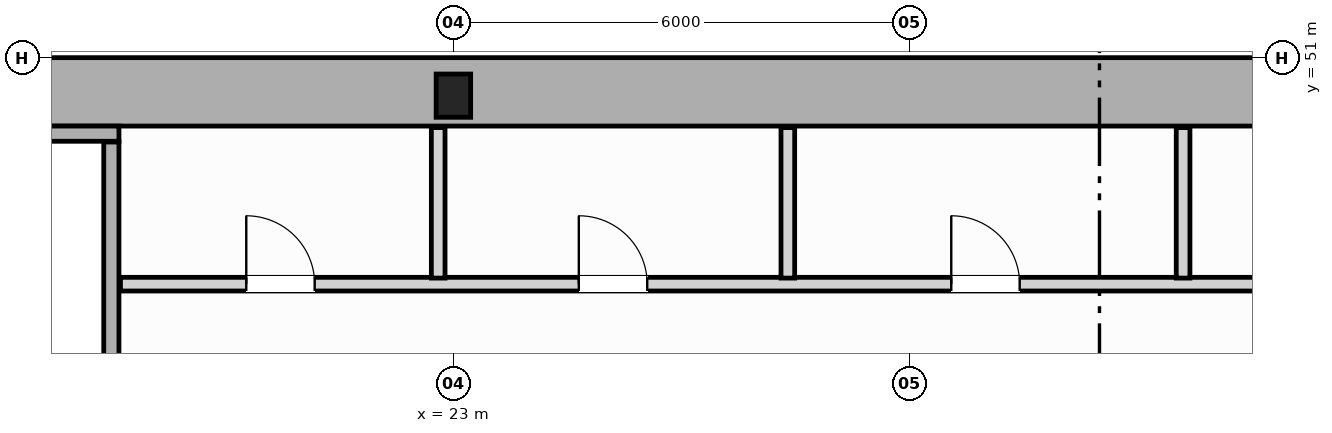
"""IFC4 building model, lengths in metres.
Left out: names, types, materials, properties, quantities, classifications, styles, units other than length and angle.
Written with IfcOpenShell. Run it as: python <this file> out.ifc"""

import sys

from ifc_helpers import new_model, si_unit, direction, frame, frame_2d, origin, origin_2d, place, context, subcontext, project, spatial, rectangle, i_section, extrude, source, transform, mapped, element, fill, save


model = new_model("IFC4")
c1 = context("Model", 3, precision=1e-05, world=origin(), true_north=direction((0.0, 1.0)))
c2 = subcontext(c1, "Body", "Model", "MODEL_VIEW")
j1 = project(units=[si_unit("LENGTHUNIT", "METRE"), si_unit("PLANEANGLEUNIT", "RADIAN")], contexts=[c1])
p1 = place(None, origin())
s1 = spatial("IfcSite", under=j1, at=p1, CompositionType="ELEMENT")
p2 = place(p1, origin())
s2 = spatial("IfcBuilding", under=s1, at=p2, CompositionType="ELEMENT")
p3 = place(p2, origin())
s3 = spatial("IfcBuildingStorey", under=s2, at=p3, CompositionType="ELEMENT", Elevation=0.0)
m1 = source(origin(), c2, "Body", "SweptSolid", [
    extrude(i_section(OverallWidth=0.454, OverallDepth=0.569, WebThickness=0.078, FlangeThickness=0.08, FilletRadius=0.015, at=origin_2d()), origin(), (0.0, 0.0, 1.0), 5.6),
])
p4 = place(p3, frame((23.0, 50.5, 0.0), z_axis=(0.0, 0.0, 1.0), x_axis=(1.0, 0.0, 0.0)))
e1 = element("IfcColumn", 1, at=p4, inside=s3, PredefinedType="COLUMN", context=c2, shape_type="MappedRepresentation", body=[
    mapped(m1, transform((0.0, 0.0, 0.0), scale=1.0)),
])
p5 = place(p3, frame((14.454, 50.55, 0.0), z_axis=(0.0, 0.0, 1.0), x_axis=(1.0, 0.0, 0.0)))
e2 = element("IfcWall", 2, at=p5, inside=s3, PredefinedType="SHEAR", context=c2, shape_type="SweptSolid", body=[
    extrude(rectangle(XDim=19.544, YDim=0.9, at=frame_2d((9.772, 0.0))), origin(), (0.0, 0.0, 1.0), 5.6),
])
p6 = place(p3, frame((14.45, 50.0, 0.0), z_axis=(0.0, 0.0, 1.0), x_axis=(1.0, 0.0, 0.0)))
e3 = element("IfcWall", 3, at=p6, inside=s3, PredefinedType="SOLIDWALL", context=c2, shape_type="SweptSolid", body=[
    extrude(rectangle(XDim=4.15, YDim=0.2, at=frame_2d((2.075, 0.0))), origin(), (0.0, 0.0, 1.0), 5.6),
])
p7 = place(p3, frame((18.5, 39.96, 0.0), z_axis=(0.0, 0.0, 1.0), x_axis=(0.0, 1.0, 0.0)))
e4 = element("IfcWall", 4, at=p7, inside=s3, PredefinedType="SOLIDWALL", context=c2, shape_type="SweptSolid", body=[
    extrude(rectangle(XDim=9.93, YDim=0.2, at=frame_2d((4.965, 0.0))), origin(), (0.0, 0.0, 1.0), 5.6),
])
p8 = place(p3, frame((18.62, 48.02, 0.0), z_axis=(0.0, 0.0, 1.0), x_axis=(1.0, 0.0, 0.0)))
e5 = element("IfcWall", 5, at=p8, inside=s3, PredefinedType="PLUMBINGWALL", context=c2, shape_type="SweptSolid", body=[
    extrude(rectangle(XDim=30.76, YDim=0.18, at=frame_2d((15.38, 0.0))), origin(), (0.0, 0.0, 1.0), 5.32),
])
p9 = place(p8, frame((1.655, 0.0, 0.0)))
e6 = element("IfcOpeningElement", 6, at=p9, cuts=e5, PredefinedType="OPENING", context=c2, shape_type="SweptSolid", body=[
    extrude(rectangle(XDim=0.9, YDim=2.15, at=frame_2d((0.45, 1.075))), frame((0.0, 0.1, 0.0), z_axis=(0.0, -1.0, 0.0), x_axis=(1.0, 0.0, 0.0)), (0.0, 0.0, 1.0), 0.2),
])
p10 = place(p8, frame((6.03, 0.0, 0.0)))
e7 = element("IfcOpeningElement", 7, at=p10, cuts=e5, PredefinedType="OPENING", context=c2, shape_type="SweptSolid", body=[
    extrude(rectangle(XDim=0.9, YDim=2.15, at=frame_2d((0.45, 1.075))), frame((0.0, 0.1, 0.0), z_axis=(0.0, -1.0, 0.0), x_axis=(1.0, 0.0, 0.0)), (0.0, 0.0, 1.0), 0.2),
])
p11 = place(p8, frame((10.93, 0.0, 0.0)))
e8 = element("IfcOpeningElement", 8, at=p11, cuts=e5, PredefinedType="OPENING", context=c2, shape_type="SweptSolid", body=[
    extrude(rectangle(XDim=0.9, YDim=2.15, at=frame_2d((0.45, 1.075))), frame((0.0, 0.1, 0.0), z_axis=(0.0, -1.0, 0.0), x_axis=(1.0, 0.0, 0.0)), (0.0, 0.0, 1.0), 0.2),
])
p12 = place(p8, frame((16.13, 0.0, 0.0)))
e9 = element("IfcOpeningElement", 9, at=p12, cuts=e5, PredefinedType="OPENING", context=c2, shape_type="SweptSolid", body=[
    extrude(rectangle(XDim=0.9, YDim=2.15, at=frame_2d((0.45, 1.075))), frame((0.0, 0.1, 0.0), z_axis=(0.0, -1.0, 0.0), x_axis=(1.0, 0.0, 0.0)), (0.0, 0.0, 1.0), 0.2),
])
p13 = place(p8, frame((21.73, 0.0, 0.0)))
e10 = element("IfcOpeningElement", 10, at=p13, cuts=e5, PredefinedType="OPENING", context=c2, shape_type="SweptSolid", body=[
    extrude(rectangle(XDim=0.9, YDim=2.15, at=frame_2d((0.45, 1.075))), frame((0.0, 0.1, 0.0), z_axis=(0.0, -1.0, 0.0), x_axis=(1.0, 0.0, 0.0)), (0.0, 0.0, 1.0), 0.2),
])
p14 = place(p8, frame((27.505, 0.0, 0.0)))
e11 = element("IfcOpeningElement", 11, at=p14, cuts=e5, PredefinedType="OPENING", context=c2, shape_type="SweptSolid", body=[
    extrude(rectangle(XDim=0.9, YDim=2.15, at=frame_2d((0.45, 1.075))), frame((0.0, 0.1, 0.0), z_axis=(0.0, -1.0, 0.0), x_axis=(1.0, 0.0, 0.0)), (0.0, 0.0, 1.0), 0.2),
])
p15 = place(p3, frame((22.8, 48.1, 0.0), z_axis=(0.0, 0.0, 1.0), x_axis=(0.0, 1.0, 0.0)))
e12 = element("IfcWall", 12, at=p15, inside=s3, PredefinedType="PLUMBINGWALL", context=c2, shape_type="SweptSolid", body=[
    extrude(rectangle(XDim=1.98, YDim=0.18, at=frame_2d((0.99, 0.0))), origin(), (0.0, 0.0, 1.0), 4.4),
])
for number, where, z_axis, x_axis in (
    (13, (27.4, 48.1, 0.0), (0.0, 0.0, 1.0), (0.0, 1.0, 0.0)),
    (14, (32.6, 48.1, 0.0), (0.0, 0.0, 1.0), (0.0, 1.0, 0.0)),
):
    element("IfcWall", number, at=place(p3, frame(where, z_axis=z_axis, x_axis=x_axis)), inside=s3, PredefinedType="PLUMBINGWALL", context=c2, shape_type="SweptSolid", body=[
        extrude(rectangle(XDim=1.98, YDim=0.18, at=frame_2d((0.99, 0.0))), origin(), (0.0, 0.0, 1.0), 5.32),
    ])
m2 = source(origin(), c2, "Body", "SweptSolid", [
    extrude(rectangle(XDim=0.9, YDim=2.15, at=frame_2d((0.45, 1.075))), frame((0.0, 0.025, 0.0), z_axis=(0.0, -1.0, 0.0), x_axis=(1.0, 0.0, 0.0)), (0.0, 0.0, 1.0), 0.05),
])
p16 = place(p9, origin())
e15 = element("IfcDoor", 15, at=p16, inside=s3, OperationType="SINGLE_SWING_LEFT", PredefinedType="DOOR", context=c2, shape_type="MappedRepresentation", body=[
    mapped(m2, transform((0.0, 0.0, 0.0), scale=1.0)),
])
fill(e6, e15)
p17 = place(p10, origin())
e16 = element("IfcDoor", 16, at=p17, inside=s3, OperationType="SINGLE_SWING_RIGHT", PredefinedType="DOOR", context=c2, shape_type="MappedRepresentation", body=[
    mapped(m2, transform((0.0, 0.0, 0.0), scale=1.0)),
])
fill(e7, e16)
p18 = place(p11, origin())
e17 = element("IfcDoor", 17, at=p18, inside=s3, OperationType="SINGLE_SWING_LEFT", PredefinedType="DOOR", context=c2, shape_type="MappedRepresentation", body=[
    mapped(m2, transform((0.0, 0.0, 0.0), scale=1.0)),
])
fill(e8, e17)
save(model, sys.argv[1])
